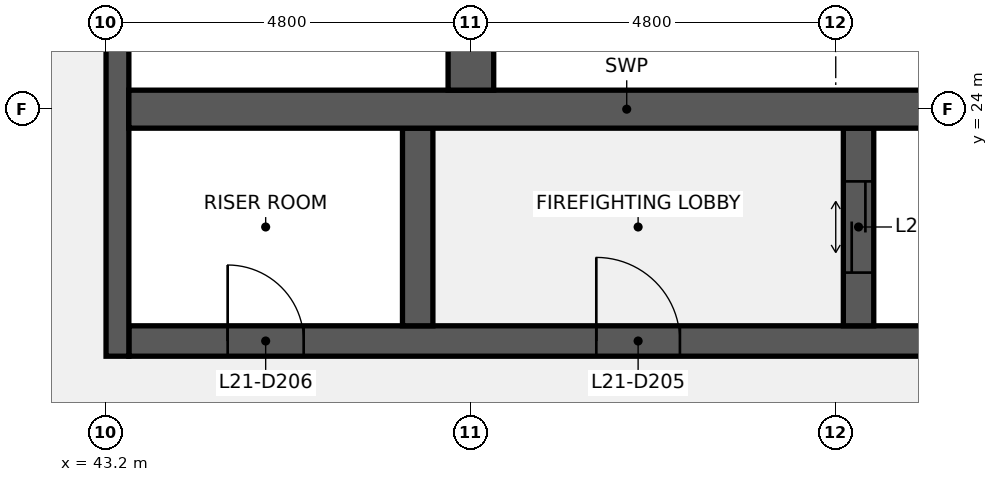
"""IFC4 building model, lengths in metres.
Left out: names, types, materials, properties, quantities, classifications, styles, units other than length and angle.
Written with IfcOpenShell. Run it as: python <this file> out.ifc"""

import sys

from ifc_helpers import new_model, si_unit, direction, frame, frame_2d, origin, place, context, subcontext, project, spatial, rectangle, extrude, element, fill, save


model = new_model("IFC4")
c1 = context("Model", 3, precision=1e-05, world=origin(), true_north=direction((0.0, 1.0)))
c2 = subcontext(c1, "Body", "Model", "MODEL_VIEW")
j1 = project(units=[si_unit("LENGTHUNIT", "METRE"), si_unit("PLANEANGLEUNIT", "RADIAN")], contexts=[c1])
p1 = place(None, origin())
s1 = spatial("IfcSite", under=j1, at=p1, CompositionType="ELEMENT")
p2 = place(p1, origin())
s2 = spatial("IfcBuilding", under=s1, at=p2, CompositionType="ELEMENT")
p3 = place(p2, frame((0.0, 0.0, 104.1)))
s3 = spatial("IfcBuildingStorey", under=s2, at=p3, CompositionType="ELEMENT", Elevation=104.1)
p4 = place(p3, frame((43.5, 20.95, 0.0), z_axis=(0.0, 0.0, 1.0), x_axis=(1.0, 0.0, 0.0)))
e1 = element("IfcWall", 1, at=p4, inside=s3, PredefinedType="SHEAR", context=c2, shape_type="SweptSolid", body=[
    extrude(rectangle(XDim=13.1, YDim=0.4, at=frame_2d((6.55, 0.0))), origin(), (0.0, 0.0, 1.0), 3.84),
])
p5 = place(p4, frame((6.15, 0.0, 0.0)))
e2 = element("IfcOpeningElement", 2, at=p5, cuts=e1, PredefinedType="OPENING", context=c2, shape_type="SweptSolid", body=[
    extrude(rectangle(XDim=1.1, YDim=2.1, at=frame_2d((0.55, 1.05))), frame((0.0, 0.21, 0.0), z_axis=(0.0, -1.0, 0.0), x_axis=(1.0, 0.0, 0.0)), (0.0, 0.0, 1.0), 0.42),
])
p6 = place(p4, frame((1.3, 0.0, 0.0)))
e3 = element("IfcOpeningElement", 3, at=p6, cuts=e1, PredefinedType="OPENING", context=c2, shape_type="SweptSolid", body=[
    extrude(rectangle(XDim=1.0, YDim=2.1, at=frame_2d((0.5, 1.05))), frame((0.0, 0.21, 0.0), z_axis=(0.0, -1.0, 0.0), x_axis=(1.0, 0.0, 0.0)), (0.0, 0.0, 1.0), 0.42),
])
p7 = place(p3, frame((43.35, 20.75, 0.0), z_axis=(0.0, 0.0, 1.0), x_axis=(0.0, 1.0, 0.0)))
e4 = element("IfcWall", 4, at=p7, inside=s3, PredefinedType="SHEAR", context=c2, shape_type="SweptSolid", body=[
    extrude(rectangle(XDim=6.5, YDim=0.3, at=frame_2d((3.25, 0.0))), origin(), (0.0, 0.0, 1.0), 3.84),
])
p8 = place(p3, frame((53.1, 21.15, 0.0), z_axis=(0.0, 0.0, 1.0), x_axis=(0.0, 1.0, 0.0)))
e5 = element("IfcWall", 5, at=p8, inside=s3, PredefinedType="SHEAR", context=c2, shape_type="SweptSolid", body=[
    extrude(rectangle(XDim=2.6, YDim=0.4, at=frame_2d((1.3, 0.0))), origin(), (0.0, 0.0, 1.0), 3.84),
])
p9 = place(p8, frame((0.7, 0.0, 0.0)))
e6 = element("IfcOpeningElement", 6, at=p9, cuts=e5, PredefinedType="OPENING", context=c2, shape_type="SweptSolid", body=[
    extrude(rectangle(XDim=1.2, YDim=2.1, at=frame_2d((0.6, 1.05))), frame((0.0, 0.21, 0.0), z_axis=(0.0, -1.0, 0.0), x_axis=(1.0, 0.0, 0.0)), (0.0, 0.0, 1.0), 0.42),
])
p10 = place(p3, frame((47.3, 21.15, 0.0), z_axis=(0.0, 0.0, 1.0), x_axis=(0.0, 1.0, 0.0)))
e7 = element("IfcWall", 7, at=p10, inside=s3, PredefinedType="SHEAR", context=c2, shape_type="SweptSolid", body=[
    extrude(rectangle(XDim=2.6, YDim=0.4, at=frame_2d((1.3, 0.0))), origin(), (0.0, 0.0, 1.0), 3.84),
])
p11 = place(p3, frame((43.5, 24.0, 0.0), z_axis=(0.0, 0.0, 1.0), x_axis=(1.0, 0.0, 0.0)))
e8 = element("IfcWall", 8, at=p11, inside=s3, PredefinedType="SHEAR", context=c2, shape_type="SweptSolid", body=[
    extrude(rectangle(XDim=13.1, YDim=0.5, at=frame_2d((6.55, 0.0))), origin(), (0.0, 0.0, 1.0), 3.84),
])
p12 = place(p3, frame((48.0, 24.25, 0.0), z_axis=(0.0, 0.0, 1.0), x_axis=(0.0, 1.0, 0.0)))
e9 = element("IfcWall", 9, at=p12, inside=s3, PredefinedType="SHEAR", context=c2, shape_type="SweptSolid", body=[
    extrude(rectangle(XDim=2.6, YDim=0.6, at=frame_2d((1.3, 0.0))), origin(), (0.0, 0.0, 1.0), 3.84),
])
p13 = place(p5, origin())
e10 = element("IfcDoor", 10, at=p13, inside=s3, OperationType="SINGLE_SWING_LEFT", PredefinedType="DOOR", context=c2, shape_type="SweptSolid", body=[
    extrude(rectangle(XDim=1.1, YDim=2.1, at=frame_2d((0.55, 1.05))), frame((0.0, 0.025, 0.0), z_axis=(0.0, -1.0, 0.0), x_axis=(1.0, 0.0, 0.0)), (0.0, 0.0, 1.0), 0.05),
])
fill(e2, e10)
p14 = place(p6, origin())
e11 = element("IfcDoor", 11, at=p14, inside=s3, OperationType="SINGLE_SWING_LEFT", PredefinedType="DOOR", context=c2, shape_type="SweptSolid", body=[
    extrude(rectangle(XDim=1.0, YDim=2.1, at=frame_2d((0.5, 1.05))), frame((0.0, 0.025, 0.0), z_axis=(0.0, -1.0, 0.0), x_axis=(1.0, 0.0, 0.0)), (0.0, 0.0, 1.0), 0.05),
])
fill(e3, e11)
p15 = place(p9, origin())
e12 = element("IfcDoor", 12, at=p15, inside=s3, OperationType="DOUBLE_DOOR_SLIDING", PredefinedType="DOOR", context=c2, shape_type="SweptSolid", body=[
    extrude(rectangle(XDim=1.2, YDim=2.1, at=frame_2d((0.6, 1.05))), frame((0.0, 0.025, 0.0), z_axis=(0.0, -1.0, 0.0), x_axis=(1.0, 0.0, 0.0)), (0.0, 0.0, 1.0), 0.05),
])
fill(e6, e12)
save(model, sys.argv[1])
